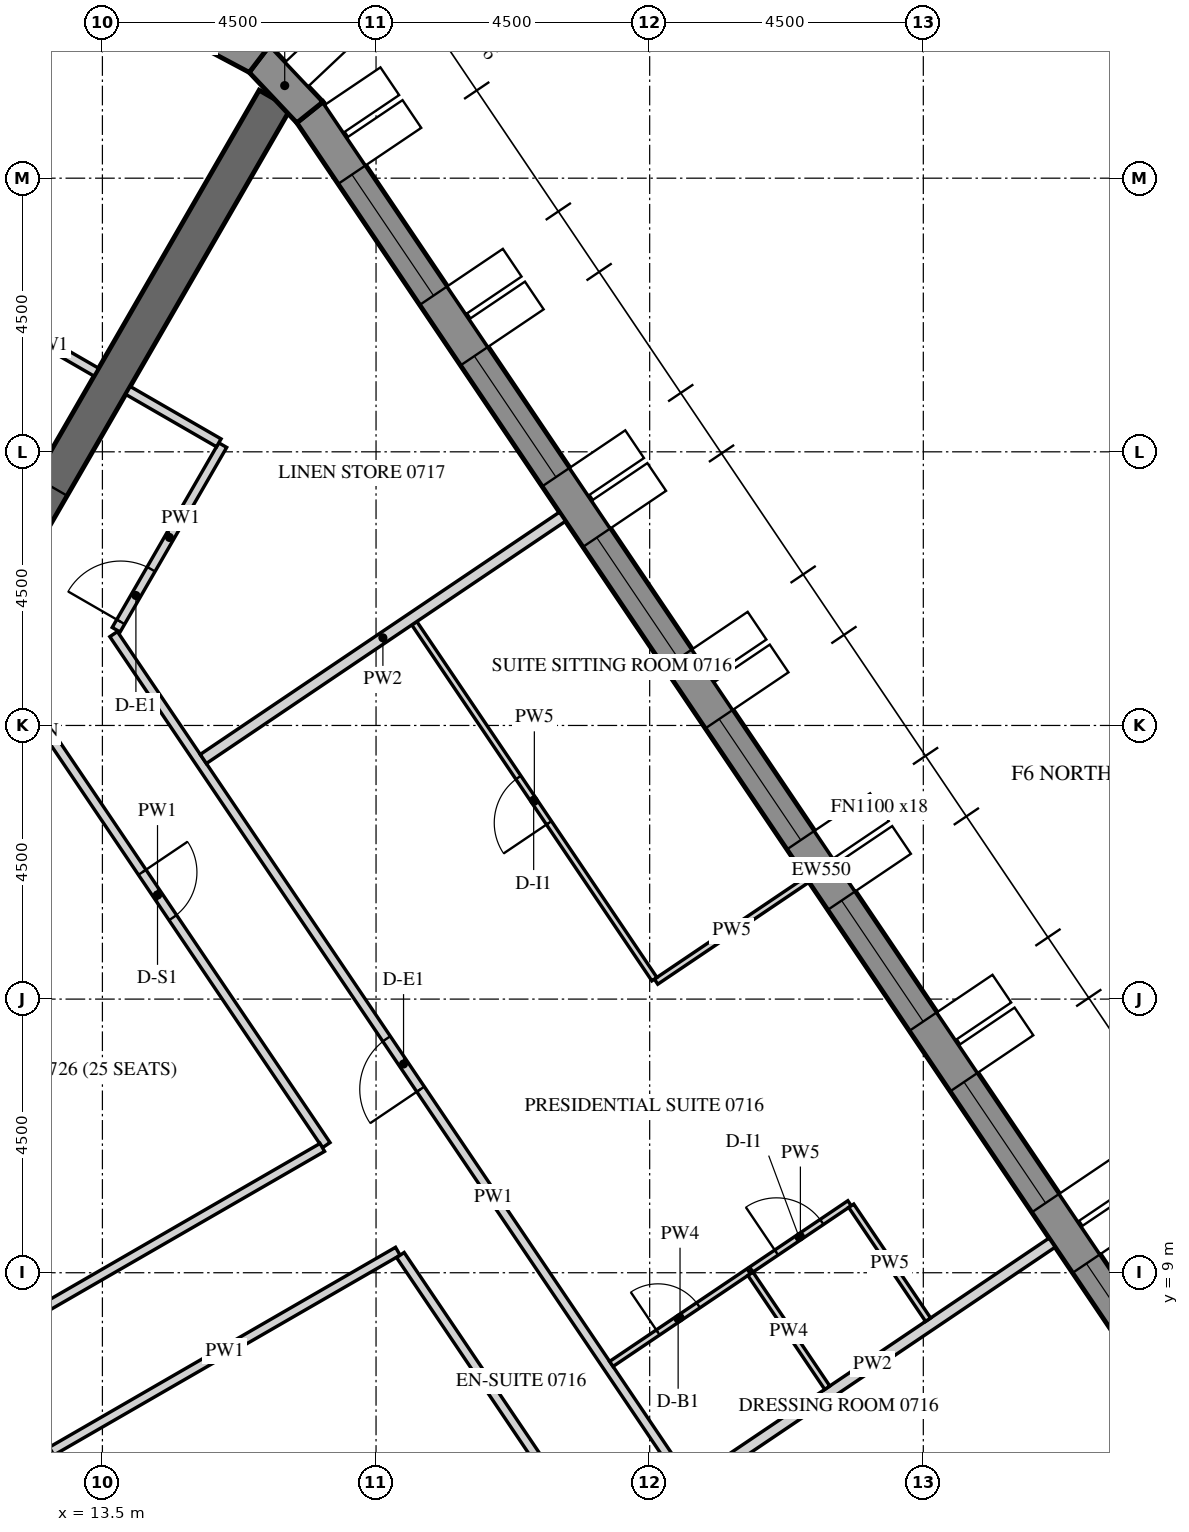
"""IFC4 building model, lengths in metres.
Left out: names, types, materials, properties, quantities, classifications, styles, units other than length and angle.
Written with IfcOpenShell. Run it as: python <this file> out.ifc"""

import sys

from ifc_helpers import new_model, si_unit, direction, frame, frame_2d, origin, place, context, subcontext, project, spatial, polyline, rectangle, outline, extrude, element, fill, save


model = new_model("IFC4")
c1 = context("Model", 3, precision=1e-05, world=origin(), true_north=direction((0.0, 1.0)))
c2 = subcontext(c1, "Body", "Model", "MODEL_VIEW")
j1 = project(units=[si_unit("LENGTHUNIT", "METRE"), si_unit("PLANEANGLEUNIT", "RADIAN")], contexts=[c1])
p1 = place(None, origin())
s1 = spatial("IfcSite", under=j1, at=p1, CompositionType="ELEMENT")
p2 = place(p1, origin())
s2 = spatial("IfcBuilding", under=s1, at=p2, CompositionType="ELEMENT")
p3 = place(p2, frame((0.0, 0.0, 99.9)))
s3 = spatial("IfcBuildingStorey", under=s2, at=p3, CompositionType="ELEMENT", Elevation=99.9)
p4 = place(p3, frame((33.728, 3.153, -0.15), z_axis=(0.0, 0.0, 1.0), x_axis=(-0.559192411416, 0.82903790445, 0.0)))
e1 = element("IfcWall", 1, at=p4, inside=s3, PredefinedType="SOLIDWALL", context=c2, shape_type="SweptSolid", body=[
    extrude(outline(polyline([(-0.026, -0.275), (30.093, -0.275), (30.048, 0.275), (0.026, 0.275), (-0.026, -0.275)])), origin(), (0.0, 0.0, 1.0), 3.9),
])
p5 = place(p4, frame((1.236, 0.0, 1.05)))
e2 = element("IfcOpeningElement", 2, at=p5, cuts=e1, PredefinedType="OPENING", context=c2, shape_type="SweptSolid", body=[
    extrude(rectangle(XDim=2.4, YDim=2.4, at=frame_2d((1.2, 1.2))), frame((0.0, 0.285, 0.0), z_axis=(0.0, -1.0, 0.0), x_axis=(1.0, 0.0, 0.0)), (0.0, 0.0, 1.0), 0.57),
])
p6 = place(p4, frame((4.835, 0.0, 1.05)))
e3 = element("IfcOpeningElement", 3, at=p6, cuts=e1, PredefinedType="OPENING", context=c2, shape_type="SweptSolid", body=[
    extrude(rectangle(XDim=2.4, YDim=2.4, at=frame_2d((1.2, 1.2))), frame((0.0, 0.285, 0.0), z_axis=(0.0, -1.0, 0.0), x_axis=(1.0, 0.0, 0.0)), (0.0, 0.0, 1.0), 0.57),
])
p7 = place(p4, frame((8.436, 0.0, 1.05)))
e4 = element("IfcOpeningElement", 4, at=p7, cuts=e1, PredefinedType="OPENING", context=c2, shape_type="SweptSolid", body=[
    extrude(rectangle(XDim=2.4, YDim=2.4, at=frame_2d((1.2, 1.2))), frame((0.0, 0.285, 0.0), z_axis=(0.0, -1.0, 0.0), x_axis=(1.0, 0.0, 0.0)), (0.0, 0.0, 1.0), 0.57),
])
p8 = place(p4, frame((12.035, 0.0, 1.05)))
e5 = element("IfcOpeningElement", 5, at=p8, cuts=e1, PredefinedType="OPENING", context=c2, shape_type="SweptSolid", body=[
    extrude(rectangle(XDim=2.4, YDim=2.4, at=frame_2d((1.2, 1.2))), frame((0.0, 0.285, 0.0), z_axis=(0.0, -1.0, 0.0), x_axis=(1.0, 0.0, 0.0)), (0.0, 0.0, 1.0), 0.57),
])
p9 = place(p4, frame((15.635, 0.0, 1.05)))
e6 = element("IfcOpeningElement", 6, at=p9, cuts=e1, PredefinedType="OPENING", context=c2, shape_type="SweptSolid", body=[
    extrude(rectangle(XDim=2.4, YDim=2.4, at=frame_2d((1.2, 1.2))), frame((0.0, 0.285, 0.0), z_axis=(0.0, -1.0, 0.0), x_axis=(1.0, 0.0, 0.0)), (0.0, 0.0, 1.0), 0.57),
])
p10 = place(p4, frame((19.236, 0.0, 1.05)))
e7 = element("IfcOpeningElement", 7, at=p10, cuts=e1, PredefinedType="OPENING", context=c2, shape_type="SweptSolid", body=[
    extrude(rectangle(XDim=2.4, YDim=2.4, at=frame_2d((1.2, 1.2))), frame((0.0, 0.285, 0.0), z_axis=(0.0, -1.0, 0.0), x_axis=(1.0, 0.0, 0.0)), (0.0, 0.0, 1.0), 0.57),
])
p11 = place(p4, frame((22.835, 0.0, 1.05)))
e8 = element("IfcOpeningElement", 8, at=p11, cuts=e1, PredefinedType="OPENING", context=c2, shape_type="SweptSolid", body=[
    extrude(rectangle(XDim=2.4, YDim=2.4, at=frame_2d((1.2, 1.2))), frame((0.0, 0.285, 0.0), z_axis=(0.0, -1.0, 0.0), x_axis=(1.0, 0.0, 0.0)), (0.0, 0.0, 1.0), 0.57),
])
p12 = place(p4, frame((26.436, 0.0, 1.05)))
e9 = element("IfcOpeningElement", 9, at=p12, cuts=e1, PredefinedType="OPENING", context=c2, shape_type="SweptSolid", body=[
    extrude(rectangle(XDim=2.4, YDim=2.4, at=frame_2d((1.2, 1.2))), frame((0.0, 0.285, 0.0), z_axis=(0.0, -1.0, 0.0), x_axis=(1.0, 0.0, 0.0)), (0.0, 0.0, 1.0), 0.57),
])
p13 = place(p3, frame((16.913, 28.083, -0.15), z_axis=(0.0, 0.0, 1.0), x_axis=(-0.686196220404, 0.727416488061, 0.0)))
e10 = element("IfcWall", 10, at=p13, inside=s3, PredefinedType="SOLIDWALL", context=c2, shape_type="SweptSolid", body=[
    extrude(outline(polyline([(-0.022, -0.275), (1.253, -0.275), (1.163, 0.275), (0.022, 0.275), (-0.022, -0.275)])), origin(), (0.0, 0.0, 1.0), 3.9),
])
p14 = place(p3, frame((16.083, 28.962, -0.15), z_axis=(0.0, 0.0, 1.0), x_axis=(-0.882995347911, 0.469381737574, 0.0)))
e11 = element("IfcWall", 11, at=p14, inside=s3, PredefinedType="SOLIDWALL", context=c2, shape_type="SweptSolid", body=[
    extrude(outline(polyline([(-0.045, -0.275), (1.253, -0.275), (1.163, 0.275), (0.045, 0.275), (-0.045, -0.275)])), origin(), (0.0, 0.0, 1.0), 3.9),
])
p15 = place(p3, frame((15.819, 0.0, -0.15), z_axis=(0.0, 0.0, 1.0), x_axis=(-0.499999880136, 0.866025472988, 0.0)))
e12 = element("IfcWall", 12, at=p15, inside=s3, PredefinedType="SHEAR", context=c2, shape_type="SweptSolid", body=[
    extrude(outline(polyline([(-0.173, -0.3), (15.993, -0.3), (15.646, 0.3), (0.173, 0.3), (-0.173, -0.3)])), origin(), (0.0, 0.0, 1.0), 3.9),
])
p16 = place(p15, frame((6.981, 0.0, 0.15)))
e13 = element("IfcOpeningElement", 13, at=p16, cuts=e12, PredefinedType="OPENING", context=c2, shape_type="SweptSolid", body=[
    extrude(rectangle(XDim=1.8, YDim=2.4, at=frame_2d((0.9, 1.2))), frame((0.0, 0.31, 0.0), z_axis=(0.0, -1.0, 0.0), x_axis=(1.0, 0.0, 0.0)), (0.0, 0.0, 1.0), 0.62),
])
p17 = place(p3, frame((8.083, 14.0, -0.15), z_axis=(0.0, 0.0, 1.0), x_axis=(0.499997680643, 0.866026742862, 0.0)))
e14 = element("IfcWall", 14, at=p17, inside=s3, PredefinedType="SHEAR", context=c2, shape_type="SweptSolid", body=[
    extrude(rectangle(XDim=16.509, YDim=0.6, at=frame_2d((8.254, 0.0))), origin(), (0.0, 0.0, 1.0), 3.9),
])
p18 = place(p17, frame((7.354, 0.0, 0.15)))
e15 = element("IfcOpeningElement", 15, at=p18, cuts=e14, PredefinedType="OPENING", context=c2, shape_type="SweptSolid", body=[
    extrude(rectangle(XDim=1.8, YDim=2.4, at=frame_2d((0.9, 1.2))), frame((0.0, 0.31, 0.0), z_axis=(0.0, -1.0, 0.0), x_axis=(1.0, 0.0, 0.0)), (0.0, 0.0, 1.0), 0.62),
])
p19 = place(p3, frame((13.4, 23.81, 0.0), z_axis=(0.0, 0.0, 1.0), x_axis=(-0.865989075817, 0.500062916607, 0.0)))
e16 = element("IfcWall", 16, at=p19, inside=s3, PredefinedType="PARTITIONING", context=c2, shape_type="SweptSolid", body=[
    extrude(rectangle(XDim=1.8, YDim=0.15, at=frame_2d((0.9, 0.0))), origin(), (0.0, 0.0, 1.0), 2.988),
])
p20 = place(p3, frame((26.174, 0.985, 0.0), z_axis=(0.0, 0.0, 1.0), x_axis=(-0.559192163771, 0.829038071488, 0.0)))
e17 = element("IfcWall", 17, at=p20, inside=s3, PredefinedType="PARTITIONING", context=c2, shape_type="SweptSolid", body=[
    extrude(rectangle(XDim=22.335, YDim=0.15, at=frame_2d((11.168, 0.0))), origin(), (0.0, 0.0, 1.0), 2.988),
])
p21 = place(p20, frame((3.463, 0.0, 0.0)))
e18 = element("IfcOpeningElement", 18, at=p21, cuts=e17, PredefinedType="OPENING", context=c2, shape_type="SweptSolid", body=[
    extrude(rectangle(XDim=1.0, YDim=2.1, at=frame_2d((0.5, 1.05))), frame((0.0, 0.085, 0.0), z_axis=(0.0, -1.0, 0.0), x_axis=(1.0, 0.0, 0.0)), (0.0, 0.0, 1.0), 0.17),
])
p22 = place(p20, frame((13.309, 0.0, 0.0)))
e19 = element("IfcOpeningElement", 19, at=p22, cuts=e17, PredefinedType="OPENING", context=c2, shape_type="SweptSolid", body=[
    extrude(rectangle(XDim=1.0, YDim=2.1, at=frame_2d((0.5, 1.05))), frame((0.0, 0.085, 0.0), z_axis=(0.0, -1.0, 0.0), x_axis=(1.0, 0.0, 0.0)), (0.0, 0.0, 1.0), 0.17),
])
p23 = place(p3, frame((13.726, 19.574, 0.0), z_axis=(0.0, 0.0, 1.0), x_axis=(0.499951531933, 0.866053385028, 0.0)))
e20 = element("IfcWall", 20, at=p23, inside=s3, PredefinedType="PARTITIONING", context=c2, shape_type="SweptSolid", body=[
    extrude(rectangle(XDim=3.506, YDim=0.15, at=frame_2d((1.753, 0.0))), origin(), (0.0, 0.0, 1.0), 2.988),
])
p24 = place(p23, frame((0.15, 0.0, 0.0)))
e21 = element("IfcOpeningElement", 21, at=p24, cuts=e20, PredefinedType="OPENING", context=c2, shape_type="SweptSolid", body=[
    extrude(rectangle(XDim=1.0, YDim=2.1, at=frame_2d((0.5, 1.05))), frame((0.0, 0.085, 0.0), z_axis=(0.0, -1.0, 0.0), x_axis=(1.0, 0.0, 0.0)), (0.0, 0.0, 1.0), 0.17),
])
p25 = place(p3, frame((15.414, 22.648, 0.0), z_axis=(0.0, 0.0, 1.0), x_axis=(-0.866074815912, 0.499914405916, 0.0)))
e22 = element("IfcWall", 22, at=p25, inside=s3, PredefinedType="PARTITIONING", context=c2, shape_type="SweptSolid", body=[
    extrude(rectangle(XDim=1.725, YDim=0.15, at=frame_2d((0.862, 0.0))), origin(), (0.0, 0.0, 1.0), 2.988),
])
p26 = place(p3, frame((12.664, 6.066, 0.0), z_axis=(0.0, 0.0, 1.0), x_axis=(0.866027295802, 0.499996722915, 0.0)))
e23 = element("IfcWall", 23, at=p26, inside=s3, PredefinedType="PARTITIONING", context=c2, shape_type="SweptSolid", body=[
    extrude(rectangle(XDim=6.575, YDim=0.15, at=frame_2d((3.288, 0.0))), origin(), (0.0, 0.0, 1.0), 2.988),
])
p27 = place(p3, frame((18.4, 9.291, 0.0), z_axis=(0.0, 0.0, 1.0), x_axis=(0.559191829043, -0.829038297265, 0.0)))
e24 = element("IfcWall", 24, at=p27, inside=s3, PredefinedType="PARTITIONING", context=c2, shape_type="SweptSolid", body=[
    extrude(rectangle(XDim=10.192, YDim=0.15, at=frame_2d((5.096, 0.0))), origin(), (0.0, 0.0, 1.0), 2.988),
])
p28 = place(p3, frame((11.632, 19.326, 0.0), z_axis=(0.0, 0.0, 1.0), x_axis=(0.559193968377, -0.829036854266, 0.0)))
e25 = element("IfcWall", 25, at=p28, inside=s3, PredefinedType="PARTITIONING", context=c2, shape_type="SweptSolid", body=[
    extrude(rectangle(XDim=9.924, YDim=0.15, at=frame_2d((4.962, 0.0))), origin(), (0.0, 0.0, 1.0), 2.988),
])
p29 = place(p28, frame((4.512, 0.0, 0.0)))
e26 = element("IfcOpeningElement", 26, at=p29, cuts=e25, PredefinedType="OPENING", context=c2, shape_type="SweptSolid", body=[
    extrude(rectangle(XDim=0.9, YDim=2.1, at=frame_2d((0.45, 1.05))), frame((0.0, 0.085, 0.0), z_axis=(0.0, -1.0, 0.0), x_axis=(1.0, 0.0, 0.0)), (0.0, 0.0, 1.0), 0.17),
])
p30 = place(p3, frame((17.116, 11.061, 0.0), z_axis=(0.0, 0.0, 1.0), x_axis=(-0.866021127751, -0.500007406234, 0.0)))
e27 = element("IfcWall", 27, at=p30, inside=s3, PredefinedType="PARTITIONING", context=c2, shape_type="SweptSolid", body=[
    extrude(rectangle(XDim=6.354, YDim=0.15, at=frame_2d((3.177, 0.0))), origin(), (0.0, 0.0, 1.0), 2.988),
])
p31 = place(p3, frame((29.119, 9.495, 0.0), z_axis=(0.0, 0.0, 1.0), x_axis=(-0.829049225145, -0.559175627408, 0.0)))
e28 = element("IfcWall", 28, at=p31, inside=s3, PredefinedType="PARTITIONING", context=c2, shape_type="SweptSolid", body=[
    extrude(rectangle(XDim=7.125, YDim=0.18, at=frame_2d((3.562, 0.0))), origin(), (0.0, 0.0, 1.0), 2.988),
])
p32 = place(p3, frame((21.87, 7.5, 0.0), z_axis=(0.0, 0.0, 1.0), x_axis=(0.829005477618, 0.559240483226, 0.0)))
e29 = element("IfcWall", 29, at=p32, inside=s3, PredefinedType="PARTITIONING", context=c2, shape_type="SweptSolid", body=[
    extrude(rectangle(XDim=2.725, YDim=0.1, at=frame_2d((1.363, 0.0))), origin(), (0.0, 0.0, 1.0), 2.988),
])
p33 = place(p32, frame((0.925, 0.0, 0.0)))
e30 = element("IfcOpeningElement", 30, at=p33, cuts=e29, PredefinedType="OPENING", context=c2, shape_type="SweptSolid", body=[
    extrude(rectangle(XDim=0.8, YDim=2.1, at=frame_2d((0.4, 1.05))), frame((0.0, 0.06, 0.0), z_axis=(0.0, -1.0, 0.0), x_axis=(1.0, 0.0, 0.0)), (0.0, 0.0, 1.0), 0.12),
])
p34 = place(p3, frame((24.17, 9.052, 0.0), z_axis=(0.0, 0.0, 1.0), x_axis=(0.829014089772, 0.559227716552, 0.0)))
e31 = element("IfcWall", 31, at=p34, inside=s3, PredefinedType="PARTITIONING", context=c2, shape_type="SweptSolid", body=[
    extrude(rectangle(XDim=1.95, YDim=0.1, at=frame_2d((0.975, 0.0))), origin(), (0.0, 0.0, 1.0), 2.988),
])
p35 = place(p34, frame((0.5, 0.0, 0.0)))
e32 = element("IfcOpeningElement", 32, at=p35, cuts=e31, PredefinedType="OPENING", context=c2, shape_type="SweptSolid", body=[
    extrude(rectangle(XDim=0.9, YDim=2.1, at=frame_2d((0.45, 1.05))), frame((0.0, 0.06, 0.0), z_axis=(0.0, -1.0, 0.0), x_axis=(1.0, 0.0, 0.0)), (0.0, 0.0, 1.0), 0.12),
])
p36 = place(p3, frame((25.815, 10.101, 0.0), z_axis=(0.0, 0.0, 1.0), x_axis=(0.559253906445, -0.828996422264, 0.0)))
e33 = element("IfcWall", 33, at=p36, inside=s3, PredefinedType="PARTITIONING", context=c2, shape_type="SweptSolid", body=[
    extrude(rectangle(XDim=2.26, YDim=0.1, at=frame_2d((1.13, 0.0))), origin(), (0.0, 0.0, 1.0), 2.988),
])
p37 = place(p3, frame((25.092, 15.464, 0.0), z_axis=(0.0, 0.0, 1.0), x_axis=(-0.829045807101, -0.559180695061, 0.0)))
e34 = element("IfcWall", 34, at=p37, inside=s3, PredefinedType="PARTITIONING", context=c2, shape_type="SweptSolid", body=[
    extrude(rectangle(XDim=3.0, YDim=0.1, at=frame_2d((1.5, 0.0))), origin(), (0.0, 0.0, 1.0), 2.988),
])
p38 = place(p3, frame((22.577, 13.828, 0.0), z_axis=(0.0, 0.0, 1.0), x_axis=(-0.559200813603, 0.829032237049, 0.0)))
e35 = element("IfcWall", 35, at=p38, inside=s3, PredefinedType="PARTITIONING", context=c2, shape_type="SweptSolid", body=[
    extrude(rectangle(XDim=7.06, YDim=0.1, at=frame_2d((3.53, 0.0))), origin(), (0.0, 0.0, 1.0), 2.988),
])
p39 = place(p38, frame((3.1, 0.0, 0.0)))
e36 = element("IfcOpeningElement", 36, at=p39, cuts=e35, PredefinedType="OPENING", context=c2, shape_type="SweptSolid", body=[
    extrude(rectangle(XDim=0.9, YDim=2.1, at=frame_2d((0.45, 1.05))), frame((0.0, 0.06, 0.0), z_axis=(0.0, -1.0, 0.0), x_axis=(1.0, 0.0, 0.0)), (0.0, 0.0, 1.0), 0.12),
])
p40 = place(p3, frame((21.066, 21.433, 0.0), z_axis=(0.0, 0.0, 1.0), x_axis=(-0.829022625118, -0.559215063318, 0.0)))
e37 = element("IfcWall", 37, at=p40, inside=s3, PredefinedType="PARTITIONING", context=c2, shape_type="SweptSolid", body=[
    extrude(rectangle(XDim=7.125, YDim=0.18, at=frame_2d((3.562, 0.0))), origin(), (0.0, 0.0, 1.0), 2.988),
])
p41 = place(p3, frame((25.42, 7.109, 0.0), z_axis=(0.0, 0.0, 1.0), x_axis=(-0.559179660023, 0.829046505219, 0.0)))
e38 = element("IfcWall", 38, at=p41, inside=s3, PredefinedType="PARTITIONING", context=c2, shape_type="SweptSolid", body=[
    extrude(rectangle(XDim=2.26, YDim=0.1, at=frame_2d((1.13, 0.0))), origin(), (0.0, 0.0, 1.0), 2.988),
])
p42 = place(p6, frame((0.0, 0.205, 0.0)))
e39 = element("IfcWindow", 39, at=p42, inside=s3, PartitioningType="DOUBLE_PANEL_VERTICAL", PredefinedType="WINDOW", context=c2, shape_type="SweptSolid", body=[
    extrude(rectangle(XDim=2.4, YDim=2.4, at=frame_2d((1.2, 1.2))), frame((0.0, 0.03, 0.0), z_axis=(0.0, -1.0, 0.0), x_axis=(1.0, 0.0, 0.0)), (0.0, 0.0, 1.0), 0.06),
])
fill(e3, e39)
p43 = place(p7, frame((0.0, 0.205, 0.0)))
e40 = element("IfcWindow", 40, at=p43, inside=s3, PartitioningType="DOUBLE_PANEL_VERTICAL", PredefinedType="WINDOW", context=c2, shape_type="SweptSolid", body=[
    extrude(rectangle(XDim=2.4, YDim=2.4, at=frame_2d((1.2, 1.2))), frame((0.0, 0.03, 0.0), z_axis=(0.0, -1.0, 0.0), x_axis=(1.0, 0.0, 0.0)), (0.0, 0.0, 1.0), 0.06),
])
fill(e4, e40)
p44 = place(p8, frame((0.0, 0.205, 0.0)))
e41 = element("IfcWindow", 41, at=p44, inside=s3, PartitioningType="DOUBLE_PANEL_VERTICAL", PredefinedType="WINDOW", context=c2, shape_type="SweptSolid", body=[
    extrude(rectangle(XDim=2.4, YDim=2.4, at=frame_2d((1.2, 1.2))), frame((0.0, 0.03, 0.0), z_axis=(0.0, -1.0, 0.0), x_axis=(1.0, 0.0, 0.0)), (0.0, 0.0, 1.0), 0.06),
])
fill(e5, e41)
p45 = place(p9, frame((0.0, 0.205, 0.0)))
e42 = element("IfcWindow", 42, at=p45, inside=s3, PartitioningType="DOUBLE_PANEL_VERTICAL", PredefinedType="WINDOW", context=c2, shape_type="SweptSolid", body=[
    extrude(rectangle(XDim=2.4, YDim=2.4, at=frame_2d((1.2, 1.2))), frame((0.0, 0.03, 0.0), z_axis=(0.0, -1.0, 0.0), x_axis=(1.0, 0.0, 0.0)), (0.0, 0.0, 1.0), 0.06),
])
fill(e6, e42)
p46 = place(p10, frame((0.0, 0.205, 0.0)))
e43 = element("IfcWindow", 43, at=p46, inside=s3, PartitioningType="DOUBLE_PANEL_VERTICAL", PredefinedType="WINDOW", context=c2, shape_type="SweptSolid", body=[
    extrude(rectangle(XDim=2.4, YDim=2.4, at=frame_2d((1.2, 1.2))), frame((0.0, 0.03, 0.0), z_axis=(0.0, -1.0, 0.0), x_axis=(1.0, 0.0, 0.0)), (0.0, 0.0, 1.0), 0.06),
])
fill(e7, e43)
p47 = place(p11, frame((0.0, 0.205, 0.0)))
e44 = element("IfcWindow", 44, at=p47, inside=s3, PartitioningType="DOUBLE_PANEL_VERTICAL", PredefinedType="WINDOW", context=c2, shape_type="SweptSolid", body=[
    extrude(rectangle(XDim=2.4, YDim=2.4, at=frame_2d((1.2, 1.2))), frame((0.0, 0.03, 0.0), z_axis=(0.0, -1.0, 0.0), x_axis=(1.0, 0.0, 0.0)), (0.0, 0.0, 1.0), 0.06),
])
fill(e8, e44)
p48 = place(p12, frame((0.0, 0.205, 0.0)))
e45 = element("IfcWindow", 45, at=p48, inside=s3, PartitioningType="DOUBLE_PANEL_VERTICAL", PredefinedType="WINDOW", context=c2, shape_type="SweptSolid", body=[
    extrude(rectangle(XDim=2.4, YDim=2.4, at=frame_2d((1.2, 1.2))), frame((0.0, 0.03, 0.0), z_axis=(0.0, -1.0, 0.0), x_axis=(1.0, 0.0, 0.0)), (0.0, 0.0, 1.0), 0.06),
])
fill(e9, e45)
p49 = place(p22, origin())
e46 = element("IfcDoor", 46, at=p49, inside=s3, OperationType="SINGLE_SWING_RIGHT", PredefinedType="DOOR", context=c2, shape_type="SweptSolid", body=[
    extrude(rectangle(XDim=1.0, YDim=2.1, at=frame_2d((0.5, 1.05))), frame((0.0, 0.025, 0.0), z_axis=(0.0, -1.0, 0.0), x_axis=(1.0, 0.0, 0.0)), (0.0, 0.0, 1.0), 0.05),
])
fill(e19, e46)
p50 = place(p33, origin())
e47 = element("IfcDoor", 47, at=p50, inside=s3, OperationType="SINGLE_SWING_RIGHT", PredefinedType="DOOR", context=c2, shape_type="SweptSolid", body=[
    extrude(rectangle(XDim=0.8, YDim=2.1, at=frame_2d((0.4, 1.05))), frame((0.0, 0.025, 0.0), z_axis=(0.0, -1.0, 0.0), x_axis=(1.0, 0.0, 0.0)), (0.0, 0.0, 1.0), 0.05),
])
fill(e30, e47)
p51 = place(p35, origin())
e48 = element("IfcDoor", 48, at=p51, inside=s3, OperationType="SINGLE_SWING_LEFT", PredefinedType="DOOR", context=c2, shape_type="SweptSolid", body=[
    extrude(rectangle(XDim=0.9, YDim=2.1, at=frame_2d((0.45, 1.05))), frame((0.0, 0.025, 0.0), z_axis=(0.0, -1.0, 0.0), x_axis=(1.0, 0.0, 0.0)), (0.0, 0.0, 1.0), 0.05),
])
fill(e32, e48)
p52 = place(p39, origin())
e49 = element("IfcDoor", 49, at=p52, inside=s3, OperationType="SINGLE_SWING_LEFT", PredefinedType="DOOR", context=c2, shape_type="SweptSolid", body=[
    extrude(rectangle(XDim=0.9, YDim=2.1, at=frame_2d((0.45, 1.05))), frame((0.0, 0.025, 0.0), z_axis=(0.0, -1.0, 0.0), x_axis=(1.0, 0.0, 0.0)), (0.0, 0.0, 1.0), 0.05),
])
fill(e36, e49)
p53 = place(p24, origin())
e50 = element("IfcDoor", 50, at=p53, inside=s3, OperationType="SINGLE_SWING_RIGHT", PredefinedType="DOOR", context=c2, shape_type="SweptSolid", body=[
    extrude(rectangle(XDim=1.0, YDim=2.1, at=frame_2d((0.5, 1.05))), frame((0.0, 0.025, 0.0), z_axis=(0.0, -1.0, 0.0), x_axis=(1.0, 0.0, 0.0)), (0.0, 0.0, 1.0), 0.05),
])
fill(e21, e50)
p54 = place(p29, origin())
e51 = element("IfcDoor", 51, at=p54, inside=s3, OperationType="SINGLE_SWING_LEFT", PredefinedType="DOOR", context=c2, shape_type="SweptSolid", body=[
    extrude(rectangle(XDim=0.9, YDim=2.1, at=frame_2d((0.45, 1.05))), frame((0.0, 0.025, 0.0), z_axis=(0.0, -1.0, 0.0), x_axis=(1.0, 0.0, 0.0)), (0.0, 0.0, 1.0), 0.05),
])
fill(e26, e51)
save(model, sys.argv[1])
